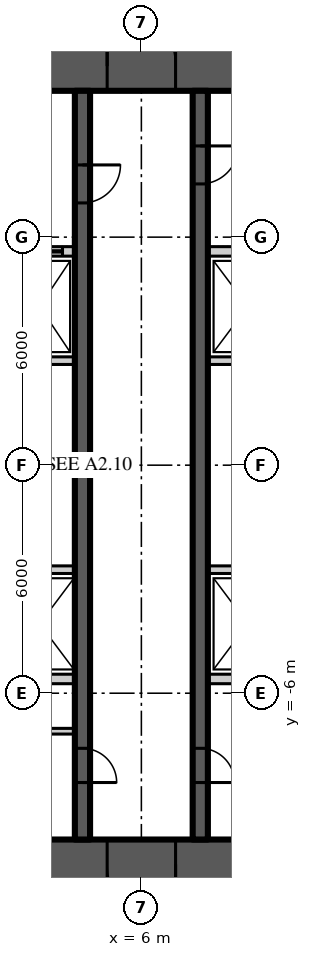
"""IFC4 building model, lengths in metres.
Left out: names, types, materials, properties, quantities, classifications, styles, units other than length and angle.
Written with IfcOpenShell. Run it as: python <this file> out.ifc"""

import sys

from ifc_helpers import new_model, si_unit, direction, frame, frame_2d, origin, place, context, subcontext, project, spatial, rectangle, extrude, element, fill, save


model = new_model("IFC4")
c1 = context("Model", 3, precision=1e-05, world=origin(), true_north=direction((0.0, 1.0)))
c2 = subcontext(c1, "Body", "Model", "MODEL_VIEW")
j1 = project(units=[si_unit("LENGTHUNIT", "METRE"), si_unit("PLANEANGLEUNIT", "RADIAN")], contexts=[c1])
p1 = place(None, origin())
s1 = spatial("IfcSite", under=j1, at=p1, CompositionType="ELEMENT")
p2 = place(p1, origin())
s2 = spatial("IfcBuilding", under=s1, at=p2, CompositionType="ELEMENT")
p3 = place(p2, frame((0.0, 0.0, 47.4)))
s3 = spatial("IfcBuildingStorey", under=s2, at=p3, CompositionType="ELEMENT", Elevation=47.4)
p4 = place(p3, frame((-11.15, 10.5, 0.0), z_axis=(0.0, 0.0, 1.0), x_axis=(1.0, 0.0, 0.0)))
e1 = element("IfcWall", 1, at=p4, inside=s3, PredefinedType="SHEAR", context=c2, shape_type="SweptSolid", body=[
    extrude(rectangle(XDim=22.3, YDim=1.3, at=frame_2d((11.15, 0.0))), origin(), (0.0, 0.0, 1.0), 3.9),
])
p5 = place(p4, frame((4.25, 0.0, 0.0)))
e2 = element("IfcOpeningElement", 2, at=p5, cuts=e1, PredefinedType="OPENING", context=c2, shape_type="SweptSolid", body=[
    extrude(rectangle(XDim=1.8, YDim=2.2, at=frame_2d((0.9, 1.1))), frame((0.0, 0.66, 0.0), z_axis=(0.0, -1.0, 0.0), x_axis=(1.0, 0.0, 0.0)), (0.0, 0.0, 1.0), 1.32),
])
p6 = place(p4, frame((16.25, 0.0, 0.0)))
e3 = element("IfcOpeningElement", 3, at=p6, cuts=e1, PredefinedType="OPENING", context=c2, shape_type="SweptSolid", body=[
    extrude(rectangle(XDim=1.8, YDim=2.2, at=frame_2d((0.9, 1.1))), frame((0.0, 0.66, 0.0), z_axis=(0.0, -1.0, 0.0), x_axis=(1.0, 0.0, 0.0)), (0.0, 0.0, 1.0), 1.32),
])
p7 = place(p3, frame((11.15, -10.5, 0.0), z_axis=(0.0, 0.0, 1.0), x_axis=(-1.0, 0.0, 0.0)))
e4 = element("IfcWall", 4, at=p7, inside=s3, PredefinedType="SHEAR", context=c2, shape_type="SweptSolid", body=[
    extrude(rectangle(XDim=22.3, YDim=1.3, at=frame_2d((11.15, 0.0))), origin(), (0.0, 0.0, 1.0), 3.9),
])
p8 = place(p7, frame((16.25, 0.0, 0.0)))
e5 = element("IfcOpeningElement", 5, at=p8, cuts=e4, PredefinedType="OPENING", context=c2, shape_type="SweptSolid", body=[
    extrude(rectangle(XDim=1.8, YDim=2.2, at=frame_2d((0.9, 1.1))), frame((0.0, 0.66, 0.0), z_axis=(0.0, -1.0, 0.0), x_axis=(1.0, 0.0, 0.0)), (0.0, 0.0, 1.0), 1.32),
])
p9 = place(p7, frame((4.25, 0.0, 0.0)))
e6 = element("IfcOpeningElement", 6, at=p9, cuts=e4, PredefinedType="OPENING", context=c2, shape_type="SweptSolid", body=[
    extrude(rectangle(XDim=1.8, YDim=2.2, at=frame_2d((0.9, 1.1))), frame((0.0, 0.66, 0.0), z_axis=(0.0, -1.0, 0.0), x_axis=(1.0, 0.0, 0.0)), (0.0, 0.0, 1.0), 1.32),
])
p10 = place(p3, frame((7.55, 9.85, 0.0), z_axis=(0.0, 0.0, 1.0), x_axis=(0.0, -1.0, 0.0)))
e7 = element("IfcWall", 7, at=p10, inside=s3, PredefinedType="SHEAR", context=c2, shape_type="SweptSolid", body=[
    extrude(rectangle(XDim=19.7, YDim=0.4, at=frame_2d((9.85, 0.0))), origin(), (0.0, 0.0, 1.0), 3.9),
])
p11 = place(p10, frame((1.45, 0.0, 0.0)))
e8 = element("IfcOpeningElement", 8, at=p11, cuts=e7, PredefinedType="OPENING", context=c2, shape_type="SweptSolid", body=[
    extrude(rectangle(XDim=1.0, YDim=2.2, at=frame_2d((0.5, 1.1))), frame((0.0, 0.21, 0.0), z_axis=(0.0, -1.0, 0.0), x_axis=(1.0, 0.0, 0.0)), (0.0, 0.0, 1.0), 0.42),
])
p12 = place(p10, frame((17.3, 0.0, 0.0)))
e9 = element("IfcOpeningElement", 9, at=p12, cuts=e7, PredefinedType="OPENING", context=c2, shape_type="SweptSolid", body=[
    extrude(rectangle(XDim=0.9, YDim=2.1, at=frame_2d((0.45, 1.05))), frame((0.0, 0.21, 0.0), z_axis=(0.0, -1.0, 0.0), x_axis=(1.0, 0.0, 0.0)), (0.0, 0.0, 1.0), 0.42),
])
p13 = place(p3, frame((4.45, 9.85, 0.0), z_axis=(0.0, 0.0, 1.0), x_axis=(0.0, -1.0, 0.0)))
e10 = element("IfcWall", 10, at=p13, inside=s3, PredefinedType="SHEAR", context=c2, shape_type="SweptSolid", body=[
    extrude(rectangle(XDim=19.7, YDim=0.4, at=frame_2d((9.85, 0.0))), origin(), (0.0, 0.0, 1.0), 3.9),
])
p14 = place(p13, frame((1.95, 0.0, 0.0)))
e11 = element("IfcOpeningElement", 11, at=p14, cuts=e10, PredefinedType="OPENING", context=c2, shape_type="SweptSolid", body=[
    extrude(rectangle(XDim=1.0, YDim=2.2, at=frame_2d((0.5, 1.1))), frame((0.0, 0.21, 0.0), z_axis=(0.0, -1.0, 0.0), x_axis=(1.0, 0.0, 0.0)), (0.0, 0.0, 1.0), 0.42),
])
p15 = place(p13, frame((17.3, 0.0, 0.0)))
e12 = element("IfcOpeningElement", 12, at=p15, cuts=e10, PredefinedType="OPENING", context=c2, shape_type="SweptSolid", body=[
    extrude(rectangle(XDim=0.9, YDim=2.1, at=frame_2d((0.45, 1.05))), frame((0.0, 0.21, 0.0), z_axis=(0.0, -1.0, 0.0), x_axis=(1.0, 0.0, 0.0)), (0.0, 0.0, 1.0), 0.42),
])
p16 = place(p3, frame((2.4, 5.625, 0.0), z_axis=(0.0, 0.0, 1.0), x_axis=(1.0, 0.0, 0.0)))
e13 = element("IfcWall", 13, at=p16, inside=s3, PredefinedType="SOLIDWALL", context=c2, shape_type="SweptSolid", body=[
    extrude(rectangle(XDim=1.85, YDim=0.25, at=frame_2d((0.925, 0.0))), origin(), (0.0, 0.0, 1.0), 3.7),
])
p17 = place(p16, frame((0.325, 0.0, 0.0)))
e14 = element("IfcOpeningElement", 14, at=p17, cuts=e13, PredefinedType="OPENING", context=c2, shape_type="SweptSolid", body=[
    extrude(rectangle(XDim=1.2, YDim=2.2, at=frame_2d((0.6, 1.1))), frame((0.0, 0.135, 0.0), z_axis=(0.0, -1.0, 0.0), x_axis=(1.0, 0.0, 0.0)), (0.0, 0.0, 1.0), 0.27),
])
p18 = place(p3, frame((7.75, 5.625, 0.0), z_axis=(0.0, 0.0, 1.0), x_axis=(1.0, 0.0, 0.0)))
e15 = element("IfcWall", 15, at=p18, inside=s3, PredefinedType="SOLIDWALL", context=c2, shape_type="SweptSolid", body=[
    extrude(rectangle(XDim=2.1, YDim=0.25, at=frame_2d((1.05, 0.0))), origin(), (0.0, 0.0, 1.0), 3.7),
])
p19 = place(p3, frame((2.4, -5.625, 0.0), z_axis=(0.0, 0.0, 1.0), x_axis=(1.0, 0.0, 0.0)))
e16 = element("IfcWall", 16, at=p19, inside=s3, PredefinedType="SOLIDWALL", context=c2, shape_type="SweptSolid", body=[
    extrude(rectangle(XDim=1.85, YDim=0.25, at=frame_2d((0.925, 0.0))), origin(), (0.0, 0.0, 1.0), 3.7),
])
p20 = place(p3, frame((7.75, -5.625, 0.0), z_axis=(0.0, 0.0, 1.0), x_axis=(1.0, 0.0, 0.0)))
e17 = element("IfcWall", 17, at=p20, inside=s3, PredefinedType="SOLIDWALL", context=c2, shape_type="SweptSolid", body=[
    extrude(rectangle(XDim=2.1, YDim=0.25, at=frame_2d((1.05, 0.0))), origin(), (0.0, 0.0, 1.0), 3.7),
])
p21 = place(p3, frame((2.4, -2.75, 0.0), z_axis=(0.0, 0.0, 1.0), x_axis=(1.0, 0.0, 0.0)))
e18 = element("IfcWall", 18, at=p21, inside=s3, PredefinedType="SOLIDWALL", context=c2, shape_type="SweptSolid", body=[
    extrude(rectangle(XDim=1.85, YDim=0.2, at=frame_2d((0.925, 0.0))), origin(), (0.0, 0.0, 1.0), 3.7),
])
p22 = place(p3, frame((7.75, -2.75, 0.0), z_axis=(0.0, 0.0, 1.0), x_axis=(1.0, 0.0, 0.0)))
e19 = element("IfcWall", 19, at=p22, inside=s3, PredefinedType="SOLIDWALL", context=c2, shape_type="SweptSolid", body=[
    extrude(rectangle(XDim=2.1, YDim=0.2, at=frame_2d((1.05, 0.0))), origin(), (0.0, 0.0, 1.0), 3.7),
])
p23 = place(p3, frame((2.4, 2.75, 0.0), z_axis=(0.0, 0.0, 1.0), x_axis=(1.0, 0.0, 0.0)))
e20 = element("IfcWall", 20, at=p23, inside=s3, PredefinedType="SOLIDWALL", context=c2, shape_type="SweptSolid", body=[
    extrude(rectangle(XDim=1.85, YDim=0.2, at=frame_2d((0.925, 0.0))), origin(), (0.0, 0.0, 1.0), 3.7),
])
p24 = place(p3, frame((7.75, 2.75, 0.0), z_axis=(0.0, 0.0, 1.0), x_axis=(1.0, 0.0, 0.0)))
e21 = element("IfcWall", 21, at=p24, inside=s3, PredefinedType="SOLIDWALL", context=c2, shape_type="SweptSolid", body=[
    extrude(rectangle(XDim=2.1, YDim=0.2, at=frame_2d((1.05, 0.0))), origin(), (0.0, 0.0, 1.0), 3.7),
])
p25 = place(p3, frame((2.4, -7.0, 0.0), z_axis=(0.0, 0.0, 1.0), x_axis=(1.0, 0.0, 0.0)))
e22 = element("IfcWall", 22, at=p25, inside=s3, PredefinedType="SOLIDWALL", context=c2, shape_type="SweptSolid", body=[
    extrude(rectangle(XDim=1.85, YDim=0.15, at=frame_2d((0.925, 0.0))), origin(), (0.0, 0.0, 1.0), 3.77),
])
p26 = place(p25, frame((0.1, 0.0, 0.0)))
e23 = element("IfcOpeningElement", 23, at=p26, cuts=e22, PredefinedType="OPENING", context=c2, shape_type="SweptSolid", body=[
    extrude(rectangle(XDim=0.9, YDim=2.1, at=frame_2d((0.45, 1.05))), frame((0.0, 0.085, 0.0), z_axis=(0.0, -1.0, 0.0), x_axis=(1.0, 0.0, 0.0)), (0.0, 0.0, 1.0), 0.17),
])
p27 = place(p6, origin())
e24 = element("IfcDoor", 24, at=p27, inside=s3, OperationType="DOUBLE_DOOR_DOUBLE_SWING", PredefinedType="DOOR", context=c2, shape_type="SweptSolid", body=[
    extrude(rectangle(XDim=1.8, YDim=2.2, at=frame_2d((0.9, 1.1))), frame((0.0, 0.025, 0.0), z_axis=(0.0, -1.0, 0.0), x_axis=(1.0, 0.0, 0.0)), (0.0, 0.0, 1.0), 0.05),
])
fill(e3, e24)
p28 = place(p9, origin())
e25 = element("IfcDoor", 25, at=p28, inside=s3, OperationType="DOUBLE_DOOR_DOUBLE_SWING", PredefinedType="DOOR", context=c2, shape_type="SweptSolid", body=[
    extrude(rectangle(XDim=1.8, YDim=2.2, at=frame_2d((0.9, 1.1))), frame((0.0, 0.025, 0.0), z_axis=(0.0, -1.0, 0.0), x_axis=(1.0, 0.0, 0.0)), (0.0, 0.0, 1.0), 0.05),
])
fill(e6, e25)
p29 = place(p11, origin())
e26 = element("IfcDoor", 26, at=p29, inside=s3, OperationType="SINGLE_SWING_LEFT", PredefinedType="DOOR", context=c2, shape_type="SweptSolid", body=[
    extrude(rectangle(XDim=1.0, YDim=2.2, at=frame_2d((0.5, 1.1))), frame((0.0, 0.025, 0.0), z_axis=(0.0, -1.0, 0.0), x_axis=(1.0, 0.0, 0.0)), (0.0, 0.0, 1.0), 0.05),
])
fill(e8, e26)
p30 = place(p14, origin())
e27 = element("IfcDoor", 27, at=p30, inside=s3, OperationType="SINGLE_SWING_LEFT", PredefinedType="DOOR", context=c2, shape_type="SweptSolid", body=[
    extrude(rectangle(XDim=1.0, YDim=2.2, at=frame_2d((0.5, 1.1))), frame((0.0, 0.025, 0.0), z_axis=(0.0, -1.0, 0.0), x_axis=(1.0, 0.0, 0.0)), (0.0, 0.0, 1.0), 0.05),
])
fill(e11, e27)
p31 = place(p12, origin())
e28 = element("IfcDoor", 28, at=p31, inside=s3, OperationType="SINGLE_SWING_RIGHT", PredefinedType="DOOR", context=c2, shape_type="SweptSolid", body=[
    extrude(rectangle(XDim=0.9, YDim=2.1, at=frame_2d((0.45, 1.05))), frame((0.0, 0.025, 0.0), z_axis=(0.0, -1.0, 0.0), x_axis=(1.0, 0.0, 0.0)), (0.0, 0.0, 1.0), 0.05),
])
fill(e9, e28)
p32 = place(p15, origin())
e29 = element("IfcDoor", 29, at=p32, inside=s3, OperationType="SINGLE_SWING_RIGHT", PredefinedType="DOOR", context=c2, shape_type="SweptSolid", body=[
    extrude(rectangle(XDim=0.9, YDim=2.1, at=frame_2d((0.45, 1.05))), frame((0.0, 0.025, 0.0), z_axis=(0.0, -1.0, 0.0), x_axis=(1.0, 0.0, 0.0)), (0.0, 0.0, 1.0), 0.05),
])
fill(e12, e29)
p33 = place(p17, origin())
e30 = element("IfcDoor", 30, at=p33, inside=s3, OperationType="SLIDING_TO_LEFT", PredefinedType="DOOR", context=c2, shape_type="SweptSolid", body=[
    extrude(rectangle(XDim=1.2, YDim=2.2, at=frame_2d((0.6, 1.1))), frame((0.0, 0.025, 0.0), z_axis=(0.0, -1.0, 0.0), x_axis=(1.0, 0.0, 0.0)), (0.0, 0.0, 1.0), 0.05),
])
fill(e14, e30)
save(model, sys.argv[1])
